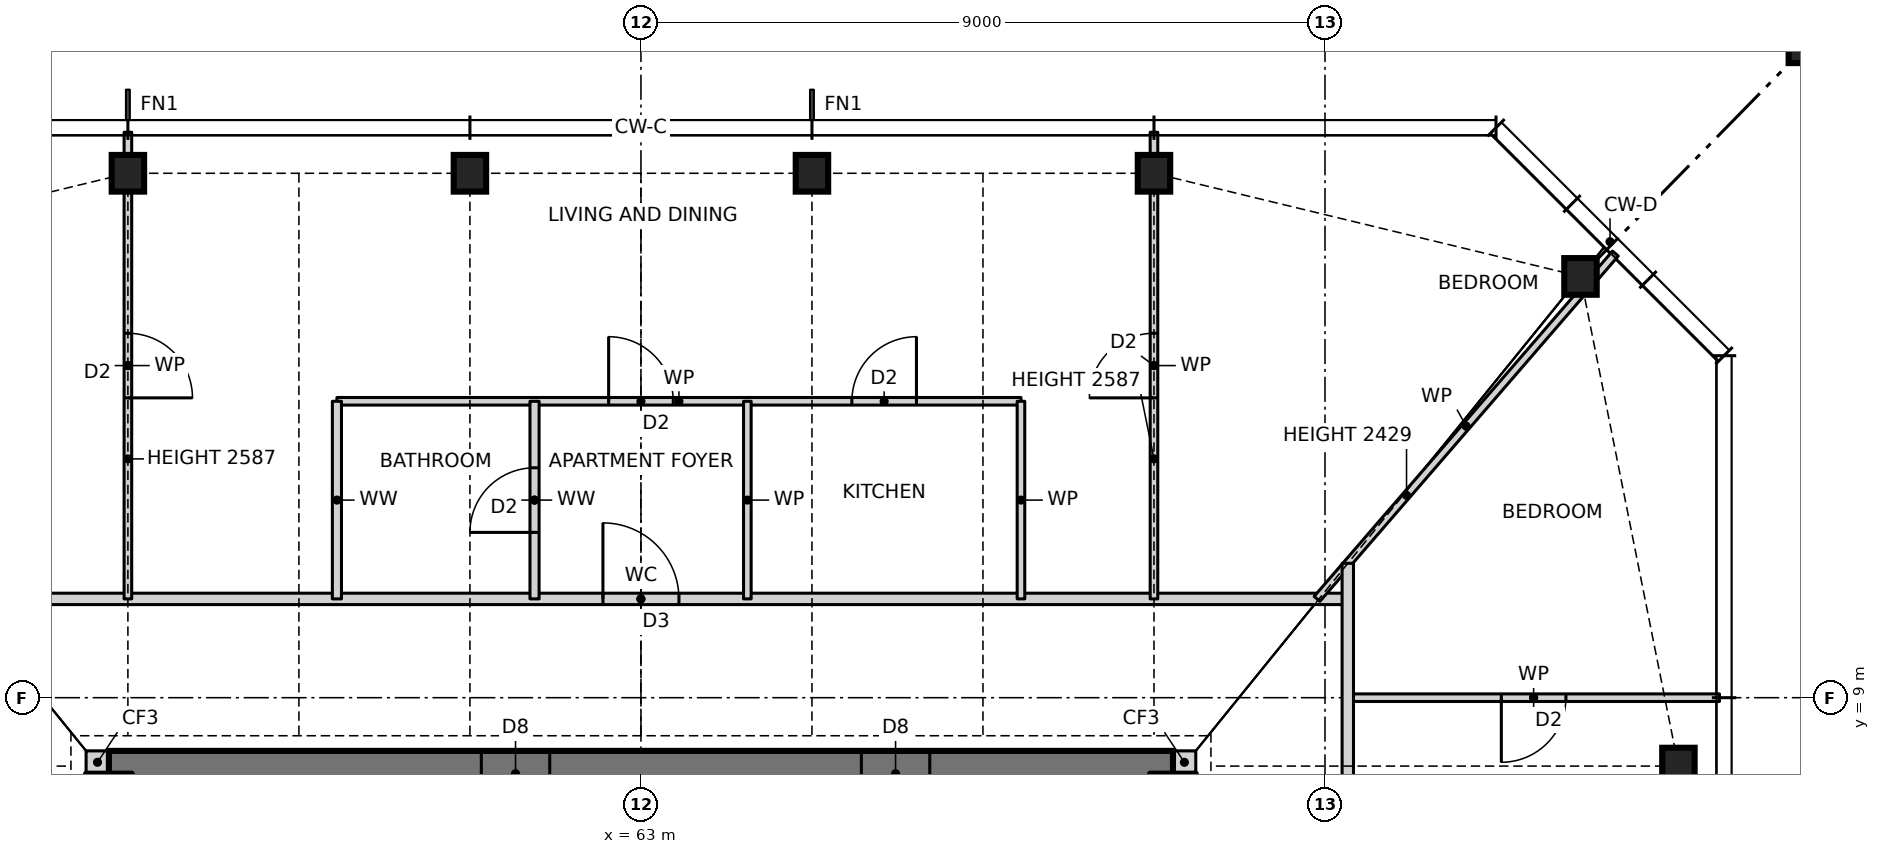
"""IFC4 building model, lengths in metres.
Left out: names, types, materials, properties, quantities, classifications, styles, units other than length and angle.
Written with IfcOpenShell. Run it as: python <this file> out.ifc"""

import sys

from ifc_helpers import new_model, si_unit, direction, frame, frame_2d, origin, origin_2d, place, context, subcontext, project, spatial, rectangle, hollow_rectangle, i_section, extrude, element, fill, save


model = new_model("IFC4")
c1 = context("Model", 3, precision=1e-05, world=origin(), true_north=direction((0.0, 1.0)))
c2 = subcontext(c1, "Body", "Model", "MODEL_VIEW")
j1 = project(units=[si_unit("LENGTHUNIT", "METRE"), si_unit("PLANEANGLEUNIT", "RADIAN")], contexts=[c1])
p1 = place(None, origin())
s1 = spatial("IfcSite", under=j1, at=p1, CompositionType="ELEMENT")
p2 = place(p1, origin())
s2 = spatial("IfcBuilding", under=s1, at=p2, CompositionType="ELEMENT")
p3 = place(p2, frame((0.0, 0.0, 84.0)))
s3 = spatial("IfcBuildingStorey", under=s2, at=p3, CompositionType="ELEMENT", Elevation=84.0)
for number, where, z_axis, x_axis in (
    (1, (76.65, 8.1, 0.0), (0.0, 0.0, 1.0), (1.0, 0.0, 0.0)),
    (2, (75.361, 14.543, 0.0), (0.0, 0.0, 1.0), (1.0, 0.0, 0.0)),
    (3, (69.75, 15.9, 0.0), (0.0, 0.0, 1.0), (1.0, 0.0, 0.0)),
    (4, (65.25, 15.9, 0.0), (0.0, 0.0, 1.0), (1.0, 0.0, 0.0)),
    (5, (60.75, 15.9, 0.0), (0.0, 0.0, 1.0), (1.0, 0.0, 0.0)),
    (6, (56.25, 15.9, 0.0), (0.0, 0.0, 1.0), (1.0, 0.0, 0.0)),
):
    element("IfcColumn", number, at=place(p3, frame(where, z_axis=z_axis, x_axis=x_axis)), inside=s3, PredefinedType="COLUMN", context=c2, shape_type="SweptSolid", body=[
        extrude(i_section(OverallWidth=0.427, OverallDepth=0.483, WebThickness=0.051, FlangeThickness=0.082, at=origin_2d()), origin(), (0.0, 0.0, 1.0), 3.5),
    ])
p4 = place(p3, frame((78.65, 17.9, 0.0), z_axis=(0.0, 0.0, 1.0), x_axis=(1.0, 0.0, 0.0)))
e7 = element("IfcColumn", 7, at=p4, inside=s3, PredefinedType="COLUMN", context=c2, shape_type="SweptSolid", body=[
    extrude(hollow_rectangle(XDim=1.1, YDim=1.1, WallThickness=0.06, at=origin_2d()), origin(), (0.0, 0.0, 1.0), 3.5),
])
for number, where, z_axis, x_axis in (
    (8, (70.0, 8.15, 0.0), (0.0, 0.0, 1.0), (1.0, 0.0, 0.0)),
    (9, (55.7, 8.15, 0.0), (0.0, 0.0, 1.0), (1.0, 0.0, 0.0)),
):
    element("IfcWall", number, at=place(p3, frame(where, z_axis=z_axis, x_axis=x_axis)), inside=s3, PredefinedType="SOLIDWALL", context=c2, shape_type="SweptSolid", body=[
        extrude(rectangle(XDim=0.3, YDim=0.3, at=frame_2d((0.15, 0.0))), origin(), (0.0, 0.0, 1.0), 3.5),
    ])
p5 = place(p3, frame((70.0, 8.0, 0.0), z_axis=(0.0, 0.0, 1.0), x_axis=(-1.0, 0.0, 0.0)))
e10 = element("IfcWall", 10, at=p5, inside=s3, PredefinedType="SHEAR", context=c2, shape_type="SweptSolid", body=[
    extrude(rectangle(XDim=14.0, YDim=0.6, at=frame_2d((7.0, 0.0))), origin(), (0.0, 0.0, 1.0), 3.5),
])
p6 = place(p5, frame((8.2, 0.0, 0.0)))
e11 = element("IfcOpeningElement", 11, at=p6, cuts=e10, PredefinedType="OPENING", context=c2, shape_type="SweptSolid", body=[
    extrude(rectangle(XDim=0.9, YDim=2.1, at=frame_2d((0.45, 1.05))), frame((0.0, 0.31, 0.0), z_axis=(0.0, -1.0, 0.0), x_axis=(1.0, 0.0, 0.0)), (0.0, 0.0, 1.0), 0.62),
])
p7 = place(p5, frame((3.2, 0.0, 0.0)))
e12 = element("IfcOpeningElement", 12, at=p7, cuts=e10, PredefinedType="OPENING", context=c2, shape_type="SweptSolid", body=[
    extrude(rectangle(XDim=0.9, YDim=2.1, at=frame_2d((0.45, 1.05))), frame((0.0, 0.31, 0.0), z_axis=(0.0, -1.0, 0.0), x_axis=(1.0, 0.0, 0.0)), (0.0, 0.0, 1.0), 0.62),
])
p8 = place(p3, frame((72.3, 9.0, 0.0), z_axis=(0.0, 0.0, 1.0), x_axis=(1.0, 0.0, 0.0)))
e13 = element("IfcWall", 13, at=p8, inside=s3, PredefinedType="PARTITIONING", context=c2, shape_type="SweptSolid", body=[
    extrude(rectangle(XDim=4.89, YDim=0.1, at=frame_2d((2.445, 0.0))), origin(), (0.0, 0.0, 1.0), 3.27),
])
p9 = place(p8, frame((2.02, 0.0, 0.0)))
e14 = element("IfcOpeningElement", 14, at=p9, cuts=e13, PredefinedType="OPENING", context=c2, shape_type="SweptSolid", body=[
    extrude(rectangle(XDim=0.85, YDim=2.1, at=frame_2d((0.425, 1.05))), frame((0.0, 0.06, 0.0), z_axis=(0.0, -1.0, 0.0), x_axis=(1.0, 0.0, 0.0)), (0.0, 0.0, 1.0), 0.12),
])
p10 = place(p3, frame((53.7, 10.3, 0.0), z_axis=(0.0, 0.0, 1.0), x_axis=(1.0, 0.0, 0.0)))
e15 = element("IfcWall", 15, at=p10, inside=s3, PredefinedType="PARTITIONING", context=c2, shape_type="SweptSolid", body=[
    extrude(rectangle(XDim=18.6, YDim=0.15, at=frame_2d((9.3, 0.0))), origin(), (0.0, 0.0, 1.0), 3.27),
])
p11 = place(p10, frame((8.8, 0.0, 0.0)))
e16 = element("IfcOpeningElement", 16, at=p11, cuts=e15, PredefinedType="OPENING", context=c2, shape_type="SweptSolid", body=[
    extrude(rectangle(XDim=1.0, YDim=2.1, at=frame_2d((0.5, 1.05))), frame((0.0, 0.085, 0.0), z_axis=(0.0, -1.0, 0.0), x_axis=(1.0, 0.0, 0.0)), (0.0, 0.0, 1.0), 0.17),
])
p12 = place(p3, frame((59.0, 12.9, 0.0), z_axis=(0.0, 0.0, 1.0), x_axis=(1.0, 0.0, 0.0)))
e17 = element("IfcWall", 17, at=p12, inside=s3, PredefinedType="PARTITIONING", context=c2, shape_type="SweptSolid", body=[
    extrude(rectangle(XDim=9.0, YDim=0.1, at=frame_2d((4.5, 0.0))), origin(), (0.0, 0.0, 1.0), 3.27),
])
p13 = place(p12, frame((6.775, 0.0, 0.0)))
e18 = element("IfcOpeningElement", 18, at=p13, cuts=e17, PredefinedType="OPENING", context=c2, shape_type="SweptSolid", body=[
    extrude(rectangle(XDim=0.85, YDim=2.1, at=frame_2d((0.425, 1.05))), frame((0.0, 0.06, 0.0), z_axis=(0.0, -1.0, 0.0), x_axis=(1.0, 0.0, 0.0)), (0.0, 0.0, 1.0), 0.12),
])
p14 = place(p12, frame((3.575, 0.0, 0.0)))
e19 = element("IfcOpeningElement", 19, at=p14, cuts=e17, PredefinedType="OPENING", context=c2, shape_type="SweptSolid", body=[
    extrude(rectangle(XDim=0.85, YDim=2.1, at=frame_2d((0.425, 1.05))), frame((0.0, 0.06, 0.0), z_axis=(0.0, -1.0, 0.0), x_axis=(1.0, 0.0, 0.0)), (0.0, 0.0, 1.0), 0.12),
])
p15 = place(p3, frame((71.895, 10.3, 0.0), z_axis=(0.0, 0.0, 1.0), x_axis=(0.65378286253, 0.756682211144, 0.0)))
e20 = element("IfcWall", 20, at=p15, inside=s3, PredefinedType="PARTITIONING", context=c2, shape_type="SweptSolid", body=[
    extrude(rectangle(XDim=6.005, YDim=0.1, at=frame_2d((3.002, 0.0))), origin(), (0.0, 0.0, 1.0), 2.429),
])
p16 = place(p3, frame((72.3, -10.9, 0.0), z_axis=(0.0, 0.0, 1.0), x_axis=(0.0, 1.0, 0.0)))
e21 = element("IfcWall", 21, at=p16, inside=s3, PredefinedType="PARTITIONING", context=c2, shape_type="SweptSolid", body=[
    extrude(rectangle(XDim=21.668, YDim=0.15, at=frame_2d((10.834, 0.0))), origin(), (0.0, 0.0, 1.0), 3.27),
])
p17 = place(p16, frame((10.4, 0.0, 0.0)))
e22 = element("IfcOpeningElement", 22, at=p17, cuts=e21, PredefinedType="OPENING", context=c2, shape_type="SweptSolid", body=[
    extrude(rectangle(XDim=1.0, YDim=2.1, at=frame_2d((0.5, 1.05))), frame((0.0, 0.085, 0.0), z_axis=(0.0, -1.0, 0.0), x_axis=(1.0, 0.0, 0.0)), (0.0, 0.0, 1.0), 0.17),
])
p18 = place(p3, frame((69.75, 10.3, 0.0), z_axis=(0.0, 0.0, 1.0), x_axis=(0.0, 1.0, 0.0)))
e23 = element("IfcWall", 23, at=p18, inside=s3, PredefinedType="PARTITIONING", context=c2, shape_type="SweptSolid", body=[
    extrude(rectangle(XDim=6.14, YDim=0.1, at=frame_2d((3.07, 0.0))), origin(), (0.0, 0.0, 1.0), 2.587),
])
p19 = place(p18, frame((2.645, 0.0, 0.0)))
e24 = element("IfcOpeningElement", 24, at=p19, cuts=e23, PredefinedType="OPENING", context=c2, shape_type="SweptSolid", body=[
    extrude(rectangle(XDim=0.85, YDim=2.1, at=frame_2d((0.425, 1.05))), frame((0.0, 0.06, 0.0), z_axis=(0.0, -1.0, 0.0), x_axis=(1.0, 0.0, 0.0)), (0.0, 0.0, 1.0), 0.12),
])
for number, where, z_axis, x_axis in (
    (25, (68.0, 10.3, 0.0), (0.0, 0.0, 1.0), (0.0, 1.0, 0.0)),
    (26, (64.4, 10.3, 0.0), (0.0, 0.0, 1.0), (0.0, 1.0, 0.0)),
):
    element("IfcWall", number, at=place(p3, frame(where, z_axis=z_axis, x_axis=x_axis)), inside=s3, PredefinedType="PARTITIONING", context=c2, shape_type="SweptSolid", body=[
        extrude(rectangle(XDim=2.6, YDim=0.1, at=frame_2d((1.3, 0.0))), origin(), (0.0, 0.0, 1.0), 3.27),
    ])
p20 = place(p3, frame((61.6, 10.3, 0.0), z_axis=(0.0, 0.0, 1.0), x_axis=(0.0, 1.0, 0.0)))
e27 = element("IfcWall", 27, at=p20, inside=s3, PredefinedType="PARTITIONING", context=c2, shape_type="SweptSolid", body=[
    extrude(rectangle(XDim=2.6, YDim=0.12, at=frame_2d((1.3, 0.0))), origin(), (0.0, 0.0, 1.0), 3.27),
])
p21 = place(p20, frame((0.875, 0.0, 0.0)))
e28 = element("IfcOpeningElement", 28, at=p21, cuts=e27, PredefinedType="OPENING", context=c2, shape_type="SweptSolid", body=[
    extrude(rectangle(XDim=0.85, YDim=2.1, at=frame_2d((0.425, 1.05))), frame((0.0, 0.07, 0.0), z_axis=(0.0, -1.0, 0.0), x_axis=(1.0, 0.0, 0.0)), (0.0, 0.0, 1.0), 0.14),
])
p22 = place(p3, frame((59.0, 10.3, 0.0), z_axis=(0.0, 0.0, 1.0), x_axis=(0.0, 1.0, 0.0)))
e29 = element("IfcWall", 29, at=p22, inside=s3, PredefinedType="PARTITIONING", context=c2, shape_type="SweptSolid", body=[
    extrude(rectangle(XDim=2.6, YDim=0.12, at=frame_2d((1.3, 0.0))), origin(), (0.0, 0.0, 1.0), 3.27),
])
p23 = place(p3, frame((56.25, 10.3, 0.0), z_axis=(0.0, 0.0, 1.0), x_axis=(0.0, 1.0, 0.0)))
e30 = element("IfcWall", 30, at=p23, inside=s3, PredefinedType="PARTITIONING", context=c2, shape_type="SweptSolid", body=[
    extrude(rectangle(XDim=6.14, YDim=0.1, at=frame_2d((3.07, 0.0))), origin(), (0.0, 0.0, 1.0), 2.587),
])
p24 = place(p23, frame((2.645, 0.0, 0.0)))
e31 = element("IfcOpeningElement", 31, at=p24, cuts=e30, PredefinedType="OPENING", context=c2, shape_type="SweptSolid", body=[
    extrude(rectangle(XDim=0.85, YDim=2.1, at=frame_2d((0.425, 1.05))), frame((0.0, 0.06, 0.0), z_axis=(0.0, -1.0, 0.0), x_axis=(1.0, 0.0, 0.0)), (0.0, 0.0, 1.0), 0.12),
])
p25 = place(p9, frame((0.85, 0.0, 0.0), z_axis=(0.0, 0.0, 1.0), x_axis=(-1.0, 0.0, 0.0)))
e32 = element("IfcDoor", 32, at=p25, inside=s3, OperationType="SINGLE_SWING_RIGHT", PredefinedType="DOOR", context=c2, shape_type="SweptSolid", body=[
    extrude(rectangle(XDim=0.85, YDim=2.1, at=frame_2d((0.425, 1.05))), frame((0.0, 0.025, 0.0), z_axis=(0.0, -1.0, 0.0), x_axis=(1.0, 0.0, 0.0)), (0.0, 0.0, 1.0), 0.05),
])
fill(e14, e32)
p26 = place(p13, origin())
e33 = element("IfcDoor", 33, at=p26, inside=s3, OperationType="SINGLE_SWING_RIGHT", PredefinedType="DOOR", context=c2, shape_type="SweptSolid", body=[
    extrude(rectangle(XDim=0.85, YDim=2.1, at=frame_2d((0.425, 1.05))), frame((0.0, 0.025, 0.0), z_axis=(0.0, -1.0, 0.0), x_axis=(1.0, 0.0, 0.0)), (0.0, 0.0, 1.0), 0.05),
])
fill(e18, e33)
p27 = place(p11, origin())
e34 = element("IfcDoor", 34, at=p27, inside=s3, OperationType="SINGLE_SWING_LEFT", PredefinedType="DOOR", context=c2, shape_type="SweptSolid", body=[
    extrude(rectangle(XDim=1.0, YDim=2.1, at=frame_2d((0.5, 1.05))), frame((0.0, 0.025, 0.0), z_axis=(0.0, -1.0, 0.0), x_axis=(1.0, 0.0, 0.0)), (0.0, 0.0, 1.0), 0.05),
])
fill(e16, e34)
p28 = place(p14, origin())
e35 = element("IfcDoor", 35, at=p28, inside=s3, OperationType="SINGLE_SWING_LEFT", PredefinedType="DOOR", context=c2, shape_type="SweptSolid", body=[
    extrude(rectangle(XDim=0.85, YDim=2.1, at=frame_2d((0.425, 1.05))), frame((0.0, 0.025, 0.0), z_axis=(0.0, -1.0, 0.0), x_axis=(1.0, 0.0, 0.0)), (0.0, 0.0, 1.0), 0.05),
])
fill(e19, e35)
p29 = place(p21, origin())
e36 = element("IfcDoor", 36, at=p29, inside=s3, OperationType="SINGLE_SWING_LEFT", PredefinedType="DOOR", context=c2, shape_type="SweptSolid", body=[
    extrude(rectangle(XDim=0.85, YDim=2.1, at=frame_2d((0.425, 1.05))), frame((0.0, 0.025, 0.0), z_axis=(0.0, -1.0, 0.0), x_axis=(1.0, 0.0, 0.0)), (0.0, 0.0, 1.0), 0.05),
])
fill(e28, e36)
p30 = place(p19, origin())
e37 = element("IfcDoor", 37, at=p30, inside=s3, OperationType="SINGLE_SWING_LEFT", PredefinedType="DOOR", context=c2, shape_type="SweptSolid", body=[
    extrude(rectangle(XDim=0.85, YDim=2.1, at=frame_2d((0.425, 1.05))), frame((0.0, 0.025, 0.0), z_axis=(0.0, -1.0, 0.0), x_axis=(1.0, 0.0, 0.0)), (0.0, 0.0, 1.0), 0.05),
])
fill(e24, e37)
p31 = place(p24, frame((0.85, 0.0, 0.0), z_axis=(0.0, 0.0, 1.0), x_axis=(-1.0, 0.0, 0.0)))
e38 = element("IfcDoor", 38, at=p31, inside=s3, OperationType="SINGLE_SWING_RIGHT", PredefinedType="DOOR", context=c2, shape_type="SweptSolid", body=[
    extrude(rectangle(XDim=0.85, YDim=2.1, at=frame_2d((0.425, 1.05))), frame((0.0, 0.025, 0.0), z_axis=(0.0, -1.0, 0.0), x_axis=(1.0, 0.0, 0.0)), (0.0, 0.0, 1.0), 0.05),
])
fill(e31, e38)
p32 = place(p6, origin())
e39 = element("IfcDoor", 39, at=p32, inside=s3, OperationType="SINGLE_SWING_RIGHT", PredefinedType="DOOR", context=c2, shape_type="SweptSolid", body=[
    extrude(rectangle(XDim=0.9, YDim=2.1, at=frame_2d((0.45, 1.05))), frame((0.0, 0.025, 0.0), z_axis=(0.0, -1.0, 0.0), x_axis=(1.0, 0.0, 0.0)), (0.0, 0.0, 1.0), 0.05),
])
fill(e11, e39)
p33 = place(p7, origin())
e40 = element("IfcDoor", 40, at=p33, inside=s3, OperationType="SINGLE_SWING_RIGHT", PredefinedType="DOOR", context=c2, shape_type="SweptSolid", body=[
    extrude(rectangle(XDim=0.9, YDim=2.1, at=frame_2d((0.45, 1.05))), frame((0.0, 0.025, 0.0), z_axis=(0.0, -1.0, 0.0), x_axis=(1.0, 0.0, 0.0)), (0.0, 0.0, 1.0), 0.05),
])
fill(e12, e40)
save(model, sys.argv[1])
